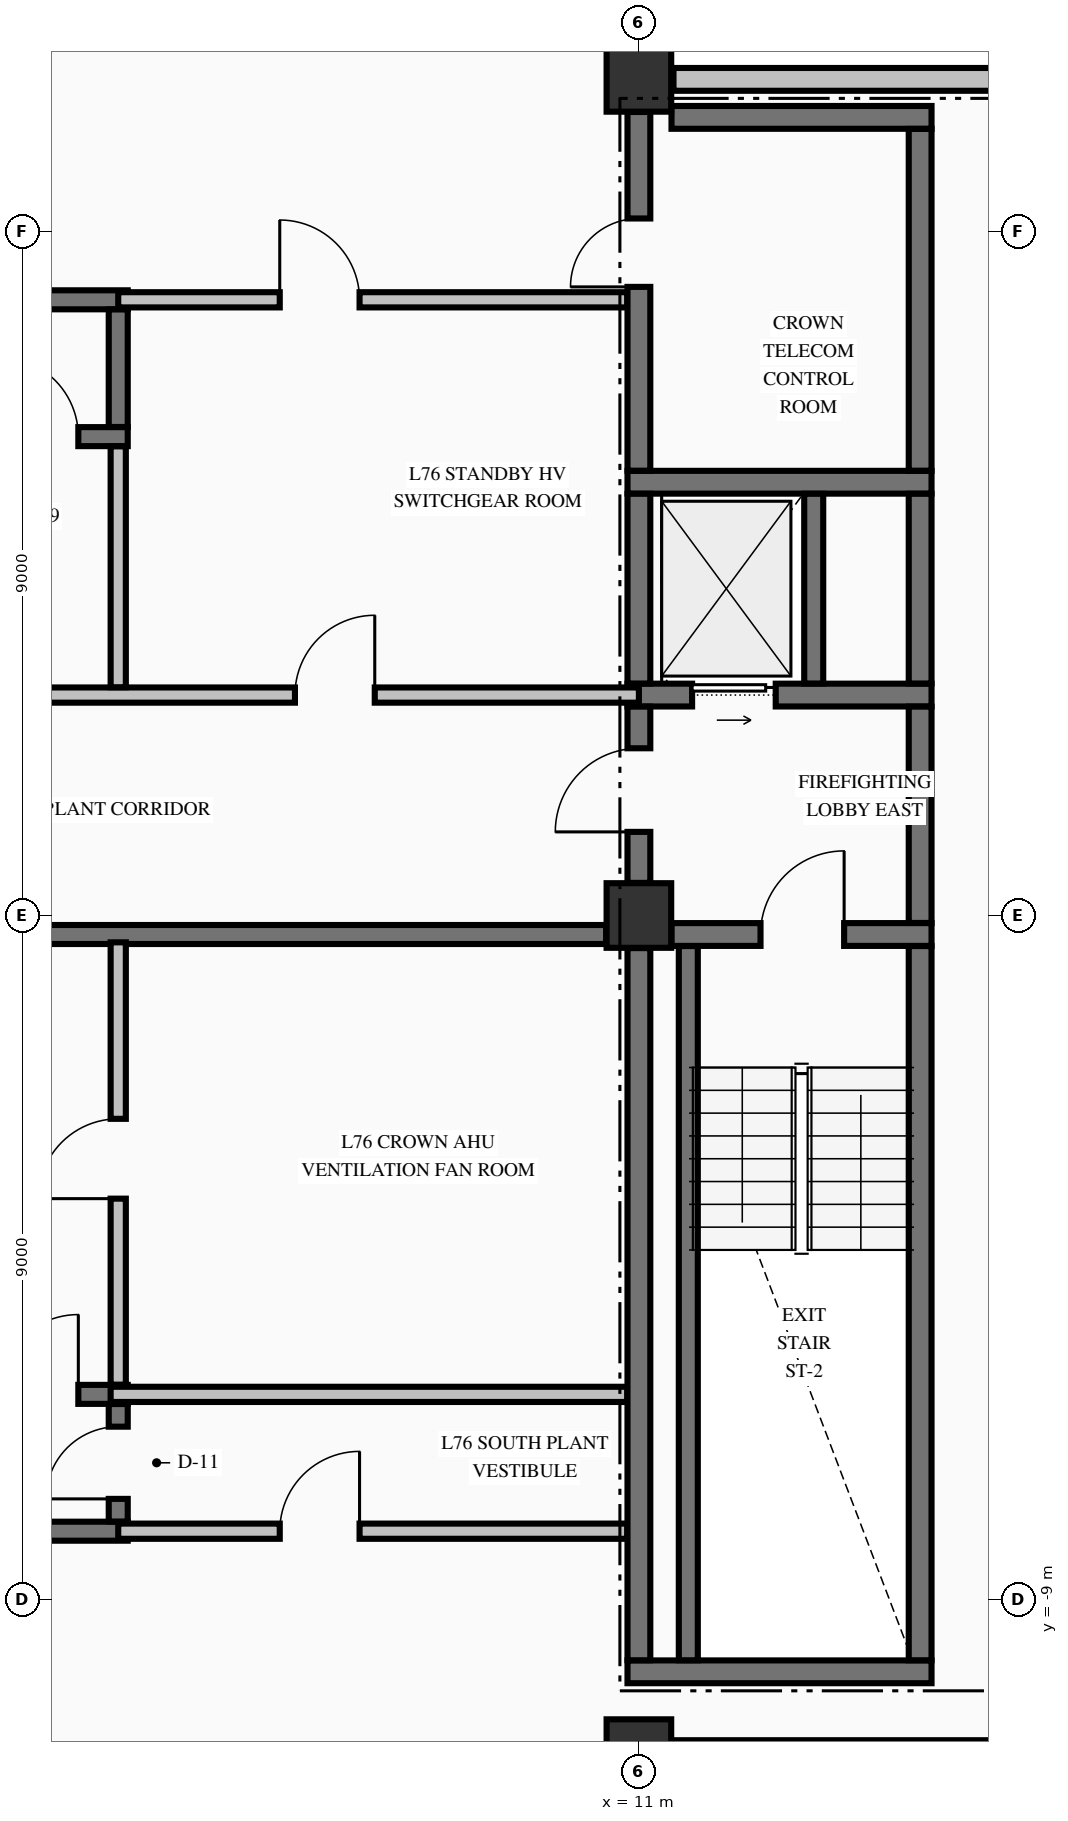
"""IFC4 building model, lengths in metres.
Left out: names, types, materials, properties, quantities, classifications, styles, units other than length and angle.
Written with IfcOpenShell. Run it as: python <this file> out.ifc"""

import sys

from ifc_helpers import new_model, si_unit, direction, frame, frame_2d, origin, origin_2d, place, context, subcontext, project, spatial, rectangle, extrude, element, fill, save


model = new_model("IFC4")
c1 = context("Model", 3, precision=1e-05, world=origin(), true_north=direction((0.0, 1.0)))
c2 = subcontext(c1, "Body", "Model", "MODEL_VIEW")
j1 = project(units=[si_unit("LENGTHUNIT", "METRE"), si_unit("PLANEANGLEUNIT", "RADIAN")], contexts=[c1])
p1 = place(None, origin())
s1 = spatial("IfcSite", under=j1, at=p1, CompositionType="ELEMENT")
p2 = place(p1, origin())
s2 = spatial("IfcBuilding", under=s1, at=p2, CompositionType="ELEMENT")
p3 = place(p2, frame((0.0, 0.0, 284.86)))
s3 = spatial("IfcBuildingStorey", under=s2, at=p3, CompositionType="ELEMENT", Elevation=284.86)
for number, where, z_axis, x_axis in (
    (1, (11.0, -11.0, -0.325), (0.0, 0.0, 1.0), (1.0, 0.0, 0.0)),
    (2, (11.0, 11.0, -0.325), (0.0, 0.0, 1.0), (1.0, 0.0, 0.0)),
    (3, (11.0, 0.0, -0.325), (0.0, 0.0, 1.0), (1.0, 0.0, 0.0)),
):
    element("IfcColumn", number, at=place(p3, frame(where, z_axis=z_axis, x_axis=x_axis)), inside=s3, PredefinedType="COLUMN", context=c2, shape_type="SweptSolid", body=[
        extrude(rectangle(XDim=0.85, YDim=0.85, at=origin_2d()), origin(), (0.0, 0.0, 1.0), 3.06),
    ])
for number, where, z_axis, x_axis in (
    (4, (11.455, -11.0, 0.0), (0.0, 0.0, 1.0), (1.0, 0.0, 0.0)),
    (5, (18.045, 11.0, 0.0), (0.0, 0.0, 1.0), (-1.0, 0.0, 0.0)),
):
    element("IfcWall", number, at=place(p3, frame(where, z_axis=z_axis, x_axis=x_axis)), inside=s3, PredefinedType="STANDARD", context=c2, shape_type="SweptSolid", body=[
        extrude(rectangle(XDim=6.59, YDim=0.3, at=frame_2d((3.295, 0.0))), origin(), (0.0, 0.0, 1.0), 1.077),
    ])
p4 = place(p3, frame((10.85, -9.95, 0.0), z_axis=(0.0, 0.0, 1.0), x_axis=(1.0, 0.0, 0.0)))
e6 = element("IfcWall", 6, at=p4, inside=s3, PredefinedType="SHEAR", context=c2, shape_type="SweptSolid", body=[
    extrude(rectangle(XDim=4.0, YDim=0.3, at=frame_2d((2.0, 0.0))), origin(), (0.0, 0.0, 1.0), 2.735),
])
p5 = place(p3, frame((-4.475, -8.1, 0.0), z_axis=(0.0, 0.0, 1.0), x_axis=(1.0, 0.0, 0.0)))
e7 = element("IfcWall", 7, at=p5, inside=s3, PredefinedType="SOLIDWALL", context=c2, shape_type="SweptSolid", body=[
    extrude(rectangle(XDim=8.75, YDim=0.25, at=frame_2d((4.375, 0.0))), origin(), (0.0, 0.0, 1.0), 2.735),
])
p6 = place(p3, frame((-4.475, -6.3, 0.0), z_axis=(0.0, 0.0, 1.0), x_axis=(1.0, 0.0, 0.0)))
e8 = element("IfcWall", 8, at=p6, inside=s3, PredefinedType="SOLIDWALL", context=c2, shape_type="SweptSolid", body=[
    extrude(rectangle(XDim=8.75, YDim=0.25, at=frame_2d((4.375, 0.0))), origin(), (0.0, 0.0, 1.0), 2.735),
])
p7 = place(p6, frame((7.05, 0.0, 0.0)))
e9 = element("IfcOpeningElement", 9, at=p7, cuts=e8, PredefinedType="OPENING", context=c2, shape_type="SweptSolid", body=[
    extrude(rectangle(XDim=1.05, YDim=2.15, at=frame_2d((0.525, 1.075))), frame((0.0, 0.135, 0.0), z_axis=(0.0, -1.0, 0.0), x_axis=(1.0, 0.0, 0.0)), (0.0, 0.0, 1.0), 0.27),
])
p8 = place(p3, frame((11.429, -0.25, 0.0), z_axis=(0.0, 0.0, 1.0), x_axis=(1.0, 0.0, 0.0)))
e10 = element("IfcWall", 10, at=p8, inside=s3, PredefinedType="SHEAR", context=c2, shape_type="SweptSolid", body=[
    extrude(rectangle(XDim=3.421, YDim=0.3, at=frame_2d((1.71, 0.0))), origin(), (0.0, 0.0, 1.0), 2.735),
])
p9 = place(p8, frame((1.171, 0.0, 0.0)))
e11 = element("IfcOpeningElement", 11, at=p9, cuts=e10, PredefinedType="OPENING", context=c2, shape_type="SweptSolid", body=[
    extrude(rectangle(XDim=1.1, YDim=2.15, at=frame_2d((0.55, 1.075))), frame((0.0, 0.16, 0.0), z_axis=(0.0, -1.0, 0.0), x_axis=(1.0, 0.0, 0.0)), (0.0, 0.0, 1.0), 0.32),
])
p10 = place(p3, frame((10.85, 2.9, 0.0), z_axis=(0.0, 0.0, 1.0), x_axis=(1.0, 0.0, 0.0)))
e12 = element("IfcWall", 12, at=p10, inside=s3, PredefinedType="SHEAR", context=c2, shape_type="SweptSolid", body=[
    extrude(rectangle(XDim=4.0, YDim=0.3, at=frame_2d((2.0, 0.0))), origin(), (0.0, 0.0, 1.0), 2.735),
])
p11 = place(p10, frame((0.85, 0.0, 0.0)))
e13 = element("IfcOpeningElement", 13, at=p11, cuts=e12, PredefinedType="OPENING", context=c2, shape_type="SweptSolid", body=[
    extrude(rectangle(XDim=1.1, YDim=2.2, at=frame_2d((0.55, 1.1))), frame((0.0, 0.16, 0.0), z_axis=(0.0, -1.0, 0.0), x_axis=(1.0, 0.0, 0.0)), (0.0, 0.0, 1.0), 0.32),
])
p12 = place(p3, frame((10.85, 5.7, 0.0), z_axis=(0.0, 0.0, 1.0), x_axis=(1.0, 0.0, 0.0)))
e14 = element("IfcWall", 14, at=p12, inside=s3, PredefinedType="SHEAR", context=c2, shape_type="SweptSolid", body=[
    extrude(rectangle(XDim=4.0, YDim=0.3, at=frame_2d((2.0, 0.0))), origin(), (0.0, 0.0, 1.0), 2.735),
])
p13 = place(p3, frame((-4.475, 6.3, 0.0), z_axis=(0.0, 0.0, 1.0), x_axis=(1.0, 0.0, 0.0)))
e15 = element("IfcWall", 15, at=p13, inside=s3, PredefinedType="SOLIDWALL", context=c2, shape_type="SweptSolid", body=[
    extrude(rectangle(XDim=8.75, YDim=0.25, at=frame_2d((4.375, 0.0))), origin(), (0.0, 0.0, 1.0), 2.735),
])
p14 = place(p13, frame((7.05, 0.0, 0.0)))
e16 = element("IfcOpeningElement", 16, at=p14, cuts=e15, PredefinedType="OPENING", context=c2, shape_type="SweptSolid", body=[
    extrude(rectangle(XDim=1.05, YDim=2.15, at=frame_2d((0.525, 1.075))), frame((0.0, 0.135, 0.0), z_axis=(0.0, -1.0, 0.0), x_axis=(1.0, 0.0, 0.0)), (0.0, 0.0, 1.0), 0.27),
])
p15 = place(p3, frame((-4.475, 8.1, 0.0), z_axis=(0.0, 0.0, 1.0), x_axis=(1.0, 0.0, 0.0)))
e17 = element("IfcWall", 17, at=p15, inside=s3, PredefinedType="SOLIDWALL", context=c2, shape_type="SweptSolid", body=[
    extrude(rectangle(XDim=8.75, YDim=0.25, at=frame_2d((4.375, 0.0))), origin(), (0.0, 0.0, 1.0), 2.735),
])
p16 = place(p3, frame((11.429, 10.5, 0.0), z_axis=(0.0, 0.0, 1.0), x_axis=(1.0, 0.0, 0.0)))
e18 = element("IfcWall", 18, at=p16, inside=s3, PredefinedType="SHEAR", context=c2, shape_type="SweptSolid", body=[
    extrude(rectangle(XDim=3.421, YDim=0.3, at=frame_2d((1.71, 0.0))), origin(), (0.0, 0.0, 1.0), 2.735),
])
p17 = place(p3, frame((4.15, -8.1, 0.0), z_axis=(0.0, 0.0, 1.0), x_axis=(1.0, 0.0, 0.0)))
e19 = element("IfcWall", 19, at=p17, inside=s3, PredefinedType="PARTITIONING", context=c2, shape_type="SweptSolid", body=[
    extrude(rectangle(XDim=6.697, YDim=0.2, at=frame_2d((3.349, 0.0))), origin(), (0.0, 0.0, 1.0), 2.735),
])
p18 = place(p17, frame((2.125, 0.0, 0.0)))
e20 = element("IfcOpeningElement", 20, at=p18, cuts=e19, PredefinedType="OPENING", context=c2, shape_type="SweptSolid", body=[
    extrude(rectangle(XDim=1.05, YDim=2.15, at=frame_2d((0.525, 1.075))), frame((0.0, 0.11, 0.0), z_axis=(0.0, -1.0, 0.0), x_axis=(1.0, 0.0, 0.0)), (0.0, 0.0, 1.0), 0.22),
])
p19 = place(p3, frame((4.05, -6.3, 0.0), z_axis=(0.0, 0.0, 1.0), x_axis=(1.0, 0.0, 0.0)))
e21 = element("IfcWall", 21, at=p19, inside=s3, PredefinedType="PARTITIONING", context=c2, shape_type="SweptSolid", body=[
    extrude(rectangle(XDim=6.797, YDim=0.2, at=frame_2d((3.398, 0.0))), origin(), (0.0, 0.0, 1.0), 2.735),
])
p20 = place(p3, frame((-10.569, -0.25, 0.0), z_axis=(0.0, 0.0, 1.0), x_axis=(1.0, 0.0, 0.0)))
e22 = element("IfcWall", 22, at=p20, inside=s3, PredefinedType="SOLIDWALL", context=c2, shape_type="SweptSolid", body=[
    extrude(rectangle(XDim=21.138, YDim=0.25, at=frame_2d((10.569, 0.0))), origin(), (0.0, 0.0, 1.0), 2.735),
])
p21 = place(p20, frame((7.519, 0.0, 0.0)))
e23 = element("IfcOpeningElement", 23, at=p21, cuts=e22, PredefinedType="OPENING", context=c2, shape_type="SweptSolid", body=[
    extrude(rectangle(XDim=0.95, YDim=2.02, at=frame_2d((0.475, 1.01))), frame((0.0, 0.135, 0.0), z_axis=(0.0, -1.0, 0.0), x_axis=(1.0, 0.0, 0.0)), (0.0, 0.0, 1.0), 0.27),
])
p22 = place(p3, frame((-11.0, 2.9, 0.0), z_axis=(0.0, 0.0, 1.0), x_axis=(1.0, 0.0, 0.0)))
e24 = element("IfcWall", 24, at=p22, inside=s3, PredefinedType="PARTITIONING", context=c2, shape_type="SweptSolid", body=[
    extrude(rectangle(XDim=22.0, YDim=0.2, at=frame_2d((11.0, 0.0))), origin(), (0.0, 0.0, 1.0), 2.735),
])
p23 = place(p22, frame((7.95, 0.0, 0.0)))
e25 = element("IfcOpeningElement", 25, at=p23, cuts=e24, PredefinedType="OPENING", context=c2, shape_type="SweptSolid", body=[
    extrude(rectangle(XDim=1.1, YDim=2.15, at=frame_2d((0.55, 1.075))), frame((0.0, 0.11, 0.0), z_axis=(0.0, -1.0, 0.0), x_axis=(1.0, 0.0, 0.0)), (0.0, 0.0, 1.0), 0.22),
])
p24 = place(p22, frame((17.475, 0.0, 0.0)))
e26 = element("IfcOpeningElement", 26, at=p24, cuts=e24, PredefinedType="OPENING", context=c2, shape_type="SweptSolid", body=[
    extrude(rectangle(XDim=1.05, YDim=2.15, at=frame_2d((0.525, 1.075))), frame((0.0, 0.11, 0.0), z_axis=(0.0, -1.0, 0.0), x_axis=(1.0, 0.0, 0.0)), (0.0, 0.0, 1.0), 0.22),
])
p25 = place(p22, frame((3.475, 0.0, 0.0)))
e27 = element("IfcOpeningElement", 27, at=p25, cuts=e24, PredefinedType="OPENING", context=c2, shape_type="SweptSolid", body=[
    extrude(rectangle(XDim=1.05, YDim=2.15, at=frame_2d((0.525, 1.075))), frame((0.0, 0.11, 0.0), z_axis=(0.0, -1.0, 0.0), x_axis=(1.0, 0.0, 0.0)), (0.0, 0.0, 1.0), 0.22),
])
p26 = place(p3, frame((4.15, 8.1, 0.0), z_axis=(0.0, 0.0, 1.0), x_axis=(1.0, 0.0, 0.0)))
e28 = element("IfcWall", 28, at=p26, inside=s3, PredefinedType="PARTITIONING", context=c2, shape_type="SweptSolid", body=[
    extrude(rectangle(XDim=6.697, YDim=0.2, at=frame_2d((3.349, 0.0))), origin(), (0.0, 0.0, 1.0), 2.735),
])
p27 = place(p26, frame((2.125, 0.0, 0.0)))
e29 = element("IfcOpeningElement", 29, at=p27, cuts=e28, PredefinedType="OPENING", context=c2, shape_type="SweptSolid", body=[
    extrude(rectangle(XDim=1.05, YDim=2.15, at=frame_2d((0.525, 1.075))), frame((0.0, 0.11, 0.0), z_axis=(0.0, -1.0, 0.0), x_axis=(1.0, 0.0, 0.0)), (0.0, 0.0, 1.0), 0.22),
])
p28 = place(p3, frame((4.15, -7.973, 0.0), z_axis=(0.0, 0.0, 1.0), x_axis=(0.0, 1.0, 0.0)))
e30 = element("IfcWall", 30, at=p28, inside=s3, PredefinedType="SOLIDWALL", context=c2, shape_type="SweptSolid", body=[
    extrude(rectangle(XDim=1.546, YDim=0.25, at=frame_2d((0.773, 0.0))), origin(), (0.0, 0.0, 1.0), 2.735),
])
p29 = place(p28, frame((0.298, 0.0, 0.0)))
e31 = element("IfcOpeningElement", 31, at=p29, cuts=e30, PredefinedType="OPENING", context=c2, shape_type="SweptSolid", body=[
    extrude(rectangle(XDim=0.95, YDim=2.15, at=frame_2d((0.475, 1.075))), frame((0.0, 0.135, 0.0), z_axis=(0.0, -1.0, 0.0), x_axis=(1.0, 0.0, 0.0)), (0.0, 0.0, 1.0), 0.27),
])
p30 = place(p3, frame((4.15, 6.427, 0.0), z_axis=(0.0, 0.0, 1.0), x_axis=(0.0, 1.0, 0.0)))
e32 = element("IfcWall", 32, at=p30, inside=s3, PredefinedType="SOLIDWALL", context=c2, shape_type="SweptSolid", body=[
    extrude(rectangle(XDim=1.546, YDim=0.25, at=frame_2d((0.773, 0.0))), origin(), (0.0, 0.0, 1.0), 2.735),
])
p31 = place(p3, frame((11.0, -9.798, 0.0), z_axis=(0.0, 0.0, 1.0), x_axis=(0.0, 1.0, 0.0)))
e33 = element("IfcWall", 33, at=p31, inside=s3, PredefinedType="SHEAR", context=c2, shape_type="SweptSolid", body=[
    extrude(rectangle(XDim=9.369, YDim=0.3, at=frame_2d((4.685, 0.0))), origin(), (0.0, 0.0, 1.0), 2.735),
])
p32 = place(p3, frame((11.0, 0.429, 0.0), z_axis=(0.0, 0.0, 1.0), x_axis=(0.0, 1.0, 0.0)))
e34 = element("IfcWall", 34, at=p32, inside=s3, PredefinedType="SHEAR", context=c2, shape_type="SweptSolid", body=[
    extrude(rectangle(XDim=2.319, YDim=0.3, at=frame_2d((1.16, 0.0))), origin(), (0.0, 0.0, 1.0), 2.735),
])
p33 = place(p32, frame((0.671, 0.0, 0.0)))
e35 = element("IfcOpeningElement", 35, at=p33, cuts=e34, PredefinedType="OPENING", context=c2, shape_type="SweptSolid", body=[
    extrude(rectangle(XDim=1.1, YDim=2.15, at=frame_2d((0.55, 1.075))), frame((0.0, 0.16, 0.0), z_axis=(0.0, -1.0, 0.0), x_axis=(1.0, 0.0, 0.0)), (0.0, 0.0, 1.0), 0.32),
])
p34 = place(p3, frame((11.0, 3.052, 0.0), z_axis=(0.0, 0.0, 1.0), x_axis=(0.0, 1.0, 0.0)))
e36 = element("IfcWall", 36, at=p34, inside=s3, PredefinedType="SHEAR", context=c2, shape_type="SweptSolid", body=[
    extrude(rectangle(XDim=2.496, YDim=0.3, at=frame_2d((1.248, 0.0))), origin(), (0.0, 0.0, 1.0), 2.735),
])
p35 = place(p3, frame((11.0, 5.852, 0.0), z_axis=(0.0, 0.0, 1.0), x_axis=(0.0, 1.0, 0.0)))
e37 = element("IfcWall", 37, at=p35, inside=s3, PredefinedType="SHEAR", context=c2, shape_type="SweptSolid", body=[
    extrude(rectangle(XDim=4.719, YDim=0.3, at=frame_2d((2.359, 0.0))), origin(), (0.0, 0.0, 1.0), 2.735),
])
p36 = place(p35, frame((2.418, 0.0, 0.0)))
e38 = element("IfcOpeningElement", 38, at=p36, cuts=e37, PredefinedType="OPENING", context=c2, shape_type="SweptSolid", body=[
    extrude(rectangle(XDim=0.9, YDim=2.15, at=frame_2d((0.45, 1.075))), frame((0.0, 0.16, 0.0), z_axis=(0.0, -1.0, 0.0), x_axis=(1.0, 0.0, 0.0)), (0.0, 0.0, 1.0), 0.32),
])
p37 = place(p3, frame((11.65, -9.798, 0.0), z_axis=(0.0, 0.0, 1.0), x_axis=(0.0, 1.0, 0.0)))
e39 = element("IfcWall", 39, at=p37, inside=s3, PredefinedType="SOLIDWALL", context=c2, shape_type="SweptSolid", body=[
    extrude(rectangle(XDim=9.396, YDim=0.25, at=frame_2d((4.698, 0.0))), origin(), (0.0, 0.0, 1.0), 2.735),
])
p38 = place(p3, frame((13.3, 3.052, 0.0), z_axis=(0.0, 0.0, 1.0), x_axis=(0.0, 1.0, 0.0)))
e40 = element("IfcWall", 40, at=p38, inside=s3, PredefinedType="SOLIDWALL", context=c2, shape_type="SweptSolid", body=[
    extrude(rectangle(XDim=2.496, YDim=0.25, at=frame_2d((1.248, 0.0))), origin(), (0.0, 0.0, 1.0), 2.735),
])
p39 = place(p3, frame((14.7, -9.798, 0.0), z_axis=(0.0, 0.0, 1.0), x_axis=(0.0, 1.0, 0.0)))
e41 = element("IfcWall", 41, at=p39, inside=s3, PredefinedType="SHEAR", context=c2, shape_type="SweptSolid", body=[
    extrude(rectangle(XDim=9.396, YDim=0.3, at=frame_2d((4.698, 0.0))), origin(), (0.0, 0.0, 1.0), 2.735),
])
p40 = place(p3, frame((14.7, -0.098, 0.0), z_axis=(0.0, 0.0, 1.0), x_axis=(0.0, 1.0, 0.0)))
e42 = element("IfcWall", 42, at=p40, inside=s3, PredefinedType="SHEAR", context=c2, shape_type="SweptSolid", body=[
    extrude(rectangle(XDim=2.846, YDim=0.3, at=frame_2d((1.423, 0.0))), origin(), (0.0, 0.0, 1.0), 2.735),
])
p41 = place(p3, frame((14.7, 3.052, 0.0), z_axis=(0.0, 0.0, 1.0), x_axis=(0.0, 1.0, 0.0)))
e43 = element("IfcWall", 43, at=p41, inside=s3, PredefinedType="SHEAR", context=c2, shape_type="SweptSolid", body=[
    extrude(rectangle(XDim=2.496, YDim=0.3, at=frame_2d((1.248, 0.0))), origin(), (0.0, 0.0, 1.0), 2.735),
])
p42 = place(p3, frame((14.7, 5.852, 0.0), z_axis=(0.0, 0.0, 1.0), x_axis=(0.0, 1.0, 0.0)))
e44 = element("IfcWall", 44, at=p42, inside=s3, PredefinedType="SHEAR", context=c2, shape_type="SweptSolid", body=[
    extrude(rectangle(XDim=4.496, YDim=0.3, at=frame_2d((2.248, 0.0))), origin(), (0.0, 0.0, 1.0), 2.735),
])
p43 = place(p3, frame((4.15, -6.172, 0.0), z_axis=(0.0, 0.0, 1.0), x_axis=(0.0, 1.0, 0.0)))
e45 = element("IfcWall", 45, at=p43, inside=s3, PredefinedType="PARTITIONING", context=c2, shape_type="SweptSolid", body=[
    extrude(rectangle(XDim=5.819, YDim=0.2, at=frame_2d((2.91, 0.0))), origin(), (0.0, 0.0, 1.0), 2.735),
])
p44 = place(p43, frame((2.447, 0.0, 0.0)))
e46 = element("IfcOpeningElement", 46, at=p44, cuts=e45, PredefinedType="OPENING", context=c2, shape_type="SweptSolid", body=[
    extrude(rectangle(XDim=1.05, YDim=2.15, at=frame_2d((0.525, 1.075))), frame((0.0, 0.11, 0.0), z_axis=(0.0, -1.0, 0.0), x_axis=(1.0, 0.0, 0.0)), (0.0, 0.0, 1.0), 0.22),
])
p45 = place(p3, frame((4.15, 3.003, 0.0), z_axis=(0.0, 0.0, 1.0), x_axis=(0.0, 1.0, 0.0)))
e47 = element("IfcWall", 47, at=p45, inside=s3, PredefinedType="PARTITIONING", context=c2, shape_type="SweptSolid", body=[
    extrude(rectangle(XDim=3.169, YDim=0.2, at=frame_2d((1.584, 0.0))), origin(), (0.0, 0.0, 1.0), 2.735),
])
p46 = place(p9, origin())
e48 = element("IfcDoor", 48, at=p46, inside=s3, OperationType="SINGLE_SWING_RIGHT", PredefinedType="DOOR", context=c2, shape_type="SweptSolid", body=[
    extrude(rectangle(XDim=1.1, YDim=2.15, at=frame_2d((0.55, 1.075))), frame((0.0, 0.025, 0.0), z_axis=(0.0, -1.0, 0.0), x_axis=(1.0, 0.0, 0.0)), (0.0, 0.0, 1.0), 0.05),
])
fill(e11, e48)
p47 = place(p33, origin())
e49 = element("IfcDoor", 49, at=p47, inside=s3, OperationType="SINGLE_SWING_LEFT", PredefinedType="DOOR", context=c2, shape_type="SweptSolid", body=[
    extrude(rectangle(XDim=1.1, YDim=2.15, at=frame_2d((0.55, 1.075))), frame((0.0, 0.025, 0.0), z_axis=(0.0, -1.0, 0.0), x_axis=(1.0, 0.0, 0.0)), (0.0, 0.0, 1.0), 0.05),
])
fill(e35, e49)
p48 = place(p11, origin())
e50 = element("IfcDoor", 50, at=p48, inside=s3, OperationType="SLIDING_TO_RIGHT", PredefinedType="DOOR", context=c2, shape_type="SweptSolid", body=[
    extrude(rectangle(XDim=1.1, YDim=2.2, at=frame_2d((0.55, 1.1))), frame((0.0, 0.025, 0.0), z_axis=(0.0, -1.0, 0.0), x_axis=(1.0, 0.0, 0.0)), (0.0, 0.0, 1.0), 0.05),
])
fill(e13, e50)
p49 = place(p36, origin())
e51 = element("IfcDoor", 51, at=p49, inside=s3, OperationType="SINGLE_SWING_LEFT", PredefinedType="DOOR", context=c2, shape_type="SweptSolid", body=[
    extrude(rectangle(XDim=0.9, YDim=2.15, at=frame_2d((0.45, 1.075))), frame((0.0, 0.025, 0.0), z_axis=(0.0, -1.0, 0.0), x_axis=(1.0, 0.0, 0.0)), (0.0, 0.0, 1.0), 0.05),
])
fill(e38, e51)
p50 = place(p7, origin())
e52 = element("IfcDoor", 52, at=p50, inside=s3, OperationType="SINGLE_SWING_RIGHT", PredefinedType="DOOR", context=c2, shape_type="SweptSolid", body=[
    extrude(rectangle(XDim=1.05, YDim=2.15, at=frame_2d((0.525, 1.075))), frame((0.0, 0.025, 0.0), z_axis=(0.0, -1.0, 0.0), x_axis=(1.0, 0.0, 0.0)), (0.0, 0.0, 1.0), 0.05),
])
fill(e9, e52)
p51 = place(p14, origin())
e53 = element("IfcDoor", 53, at=p51, inside=s3, OperationType="SINGLE_SWING_LEFT", PredefinedType="DOOR", context=c2, shape_type="SweptSolid", body=[
    extrude(rectangle(XDim=1.05, YDim=2.15, at=frame_2d((0.525, 1.075))), frame((0.0, 0.025, 0.0), z_axis=(0.0, -1.0, 0.0), x_axis=(1.0, 0.0, 0.0)), (0.0, 0.0, 1.0), 0.05),
])
fill(e16, e53)
p52 = place(p44, origin())
e54 = element("IfcDoor", 54, at=p52, inside=s3, OperationType="SINGLE_SWING_LEFT", PredefinedType="DOOR", context=c2, shape_type="SweptSolid", body=[
    extrude(rectangle(XDim=1.05, YDim=2.15, at=frame_2d((0.525, 1.075))), frame((0.0, 0.025, 0.0), z_axis=(0.0, -1.0, 0.0), x_axis=(1.0, 0.0, 0.0)), (0.0, 0.0, 1.0), 0.05),
])
fill(e46, e54)
p53 = place(p24, origin())
e55 = element("IfcDoor", 55, at=p53, inside=s3, OperationType="SINGLE_SWING_RIGHT", PredefinedType="DOOR", context=c2, shape_type="SweptSolid", body=[
    extrude(rectangle(XDim=1.05, YDim=2.15, at=frame_2d((0.525, 1.075))), frame((0.0, 0.025, 0.0), z_axis=(0.0, -1.0, 0.0), x_axis=(1.0, 0.0, 0.0)), (0.0, 0.0, 1.0), 0.05),
])
fill(e26, e55)
p54 = place(p27, origin())
e56 = element("IfcDoor", 56, at=p54, inside=s3, OperationType="SINGLE_SWING_LEFT", PredefinedType="DOOR", context=c2, shape_type="SweptSolid", body=[
    extrude(rectangle(XDim=1.05, YDim=2.15, at=frame_2d((0.525, 1.075))), frame((0.0, 0.025, 0.0), z_axis=(0.0, -1.0, 0.0), x_axis=(1.0, 0.0, 0.0)), (0.0, 0.0, 1.0), 0.05),
])
fill(e29, e56)
p55 = place(p29, origin())
e57 = element("IfcDoor", 57, at=p55, inside=s3, OperationType="SINGLE_SWING_LEFT", PredefinedType="DOOR", context=c2, shape_type="SweptSolid", body=[
    extrude(rectangle(XDim=0.95, YDim=2.15, at=frame_2d((0.475, 1.075))), frame((0.0, 0.025, 0.0), z_axis=(0.0, -1.0, 0.0), x_axis=(1.0, 0.0, 0.0)), (0.0, 0.0, 1.0), 0.05),
])
fill(e31, e57)
p56 = place(p18, origin())
e58 = element("IfcDoor", 58, at=p56, inside=s3, OperationType="SINGLE_SWING_RIGHT", PredefinedType="DOOR", context=c2, shape_type="SweptSolid", body=[
    extrude(rectangle(XDim=1.05, YDim=2.15, at=frame_2d((0.525, 1.075))), frame((0.0, 0.025, 0.0), z_axis=(0.0, -1.0, 0.0), x_axis=(1.0, 0.0, 0.0)), (0.0, 0.0, 1.0), 0.05),
])
fill(e20, e58)
save(model, sys.argv[1])
